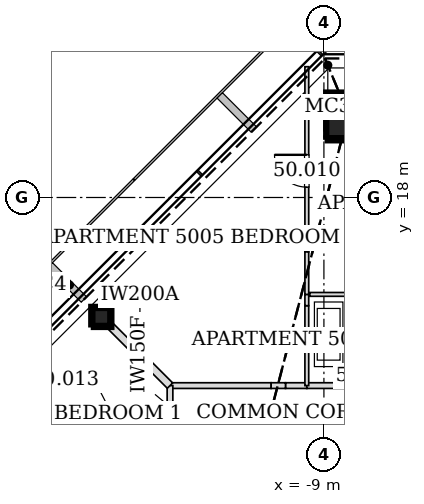
"""IFC4 building model, lengths in metres.
Left out: names, types, materials, properties, quantities, classifications, styles, units other than length and angle.
Written with IfcOpenShell. Run it as: python <this file> out.ifc"""

import sys

from ifc_helpers import new_model, si_unit, direction, frame, frame_2d, origin, origin_2d, place, context, subcontext, project, spatial, rectangle, hollow_rectangle, extrude, element, fill, save


model = new_model("IFC4")
c1 = context("Model", 3, precision=1e-05, world=origin(), true_north=direction((0.0, 1.0)))
c2 = subcontext(c1, "Body", "Model", "MODEL_VIEW")
j1 = project(units=[si_unit("LENGTHUNIT", "METRE"), si_unit("PLANEANGLEUNIT", "RADIAN")], contexts=[c1])
p1 = place(None, origin())
s1 = spatial("IfcSite", under=j1, at=p1, CompositionType="ELEMENT")
p2 = place(p1, origin())
s2 = spatial("IfcBuilding", under=s1, at=p2, CompositionType="ELEMENT")
p3 = place(p2, frame((0.0, 0.0, 217.6)))
s3 = spatial("IfcBuildingStorey", under=s2, at=p3, CompositionType="ELEMENT", Elevation=217.6)
p4 = place(p3, frame((-8.359, 20.181, 0.0), z_axis=(0.01169924247, -0.02827915051, 0.999531598986), x_axis=(0.924045401938, 0.382282742426, 0.0)))
e1 = element("IfcColumn", 1, at=p4, inside=s3, PredefinedType="COLUMN", context=c2, shape_type="SweptSolid", body=[
    extrude(hollow_rectangle(XDim=1.2, YDim=1.2, WallThickness=0.055, at=origin_2d()), origin(), (0.0, 0.0, 1.0), 3.402),
])
p5 = place(p3, frame((-14.891, 14.891, 0.0), z_axis=(0.020026431307, -0.020026431307, 0.999598861593), x_axis=(0.707106781187, 0.707106781187, 0.0)))
e2 = element("IfcColumn", 2, at=p5, inside=s3, PredefinedType="COLUMN", context=c2, shape_type="SweptSolid", body=[
    extrude(hollow_rectangle(XDim=0.5, YDim=0.5, WallThickness=0.025, at=origin_2d()), origin(), (0.0, 0.0, 1.0), 3.401),
])
p6 = place(p3, frame((-9.449, 13.05, 0.0), z_axis=(0.0, 0.0, 1.0), x_axis=(-1.0, 0.0, 0.0)))
e3 = element("IfcWall", 3, at=p6, inside=s3, PredefinedType="PARTITIONING", context=c2, shape_type="SweptSolid", body=[
    extrude(rectangle(XDim=0.562, YDim=0.15, at=frame_2d((0.281, 0.0))), origin(), (0.0, 0.0, 1.0), 3.2),
])
p7 = place(p3, frame((-10.389, 13.05, 0.0), z_axis=(0.0, 0.0, 1.0), x_axis=(-1.0, 0.0, 0.0)))
e4 = element("IfcWall", 4, at=p7, inside=s3, PredefinedType="PARTITIONING", context=c2, shape_type="SweptSolid", body=[
    extrude(rectangle(XDim=2.661, YDim=0.15, at=frame_2d((1.331, 0.0))), origin(), (0.0, 0.0, 1.0), 2.578),
])
p8 = place(p3, frame((-10.011, 13.05, 0.0), z_axis=(0.0, 0.0, 1.0), x_axis=(-1.0, 0.0, 0.0)))
e5 = element("IfcWall", 5, at=p8, inside=s3, PredefinedType="PARTITIONING", context=c2, shape_type="SweptSolid", body=[
    extrude(rectangle(XDim=0.378, YDim=0.15, at=frame_2d((0.189, 0.0))), origin(), (0.0, 0.0, 1.0), 2.268),
])
p9 = place(p3, frame((-7.249, 13.05, 0.0), z_axis=(0.0, 0.0, 1.0), x_axis=(-1.0, 0.0, 0.0)))
e6 = element("IfcWall", 6, at=p9, inside=s3, PredefinedType="PARTITIONING", context=c2, shape_type="SweptSolid", body=[
    extrude(rectangle(XDim=2.202, YDim=0.15, at=frame_2d((1.101, 0.0))), origin(), (0.0, 0.0, 1.0), 3.2),
])
p10 = place(p3, frame((-13.05, 13.05, 0.0), z_axis=(0.0, 0.0, 1.0), x_axis=(0.0, -1.0, 0.0)))
e7 = element("IfcWall", 7, at=p10, inside=s3, PredefinedType="PARTITIONING", context=c2, shape_type="SweptSolid", body=[
    extrude(rectangle(XDim=1.401, YDim=0.15, at=frame_2d((0.701, 0.0))), origin(), (0.0, 0.0, 1.0), 2.578),
])
p11 = place(p3, frame((-9.45, 13.05, 0.0), z_axis=(0.0, 0.0, 1.0), x_axis=(0.0, 1.0, 0.0)))
e8 = element("IfcWall", 8, at=p11, inside=s3, PredefinedType="PARTITIONING", context=c2, shape_type="SweptSolid", body=[
    extrude(rectangle(XDim=2.103, YDim=0.1, at=frame_2d((1.052, 0.0))), origin(), (0.0, 0.0, 1.0), 2.591),
])
p12 = place(p3, frame((-9.45, 15.153, 0.0), z_axis=(0.0, 0.0, 1.0), x_axis=(0.0, 1.0, 0.0)))
e9 = element("IfcWall", 9, at=p12, inside=s3, PredefinedType="PARTITIONING", context=c2, shape_type="SweptSolid", body=[
    extrude(rectangle(XDim=0.298, YDim=0.1, at=frame_2d((0.149, 0.0))), origin(), (0.0, 0.0, 1.0), 2.268),
])
p13 = place(p3, frame((-9.45, 16.568, 0.0), z_axis=(0.0, 0.0, 1.0), x_axis=(0.0, 1.0, 0.0)))
e10 = element("IfcWall", 10, at=p13, inside=s3, PredefinedType="PARTITIONING", context=c2, shape_type="SweptSolid", body=[
    extrude(rectangle(XDim=4.873, YDim=0.1, at=frame_2d((2.437, 0.0))), origin(), (0.0, 0.0, 1.0), 2.783),
])
p14 = place(p13, frame((1.704, 0.0, 0.0)))
e11 = element("IfcOpeningElement", 11, at=p14, cuts=e10, PredefinedType="OPENING", context=c2, shape_type="SweptSolid", body=[
    extrude(rectangle(XDim=0.85, YDim=2.1, at=frame_2d((0.425, 1.05))), frame((0.0, 0.06, 0.0), z_axis=(0.0, -1.0, 0.0), x_axis=(1.0, 0.0, 0.0)), (0.0, 0.0, 1.0), 0.12),
])
p15 = place(p3, frame((-9.45, 15.449, 0.0), z_axis=(0.0, 0.0, 1.0), x_axis=(0.0, 1.0, 0.0)))
e12 = element("IfcWall", 12, at=p15, inside=s3, PredefinedType="PARTITIONING", context=c2, shape_type="SweptSolid", body=[
    extrude(rectangle(XDim=1.119, YDim=0.1, at=frame_2d((0.56, 0.0))), origin(), (0.0, 0.0, 1.0), 2.268),
])
p16 = place(p3, frame((-14.633, 14.633, 0.0), z_axis=(0.0, 0.0, 1.0), x_axis=(0.707106781187, -0.707106781187, 0.0)))
e13 = element("IfcWall", 13, at=p16, inside=s3, PredefinedType="PARTITIONING", context=c2, shape_type="SweptSolid", body=[
    extrude(rectangle(XDim=2.238, YDim=0.2, at=frame_2d((1.119, 0.0))), origin(), (0.0, 0.0, 1.0), 2.578),
])
p17 = place(p3, frame((-7.25, 15.45, 0.0), z_axis=(0.0, 0.0, 1.0), x_axis=(-1.0, 0.0, 0.0)))
e14 = element("IfcWall", 14, at=p17, inside=s3, PredefinedType="PARTITIONING", context=c2, shape_type="SweptSolid", body=[
    extrude(rectangle(XDim=2.121, YDim=0.1, at=frame_2d((1.061, 0.0))), origin(), (0.0, 0.0, 1.0), 3.2),
])
p18 = place(p14, origin())
e15 = element("IfcDoor", 15, at=p18, inside=s3, OperationType="SINGLE_SWING_RIGHT", PredefinedType="DOOR", context=c2, shape_type="SweptSolid", body=[
    extrude(rectangle(XDim=0.85, YDim=2.1, at=frame_2d((0.425, 1.05))), frame((0.0, 0.025, 0.0), z_axis=(0.0, -1.0, 0.0), x_axis=(1.0, 0.0, 0.0)), (0.0, 0.0, 1.0), 0.05),
])
fill(e11, e15)
save(model, sys.argv[1])
